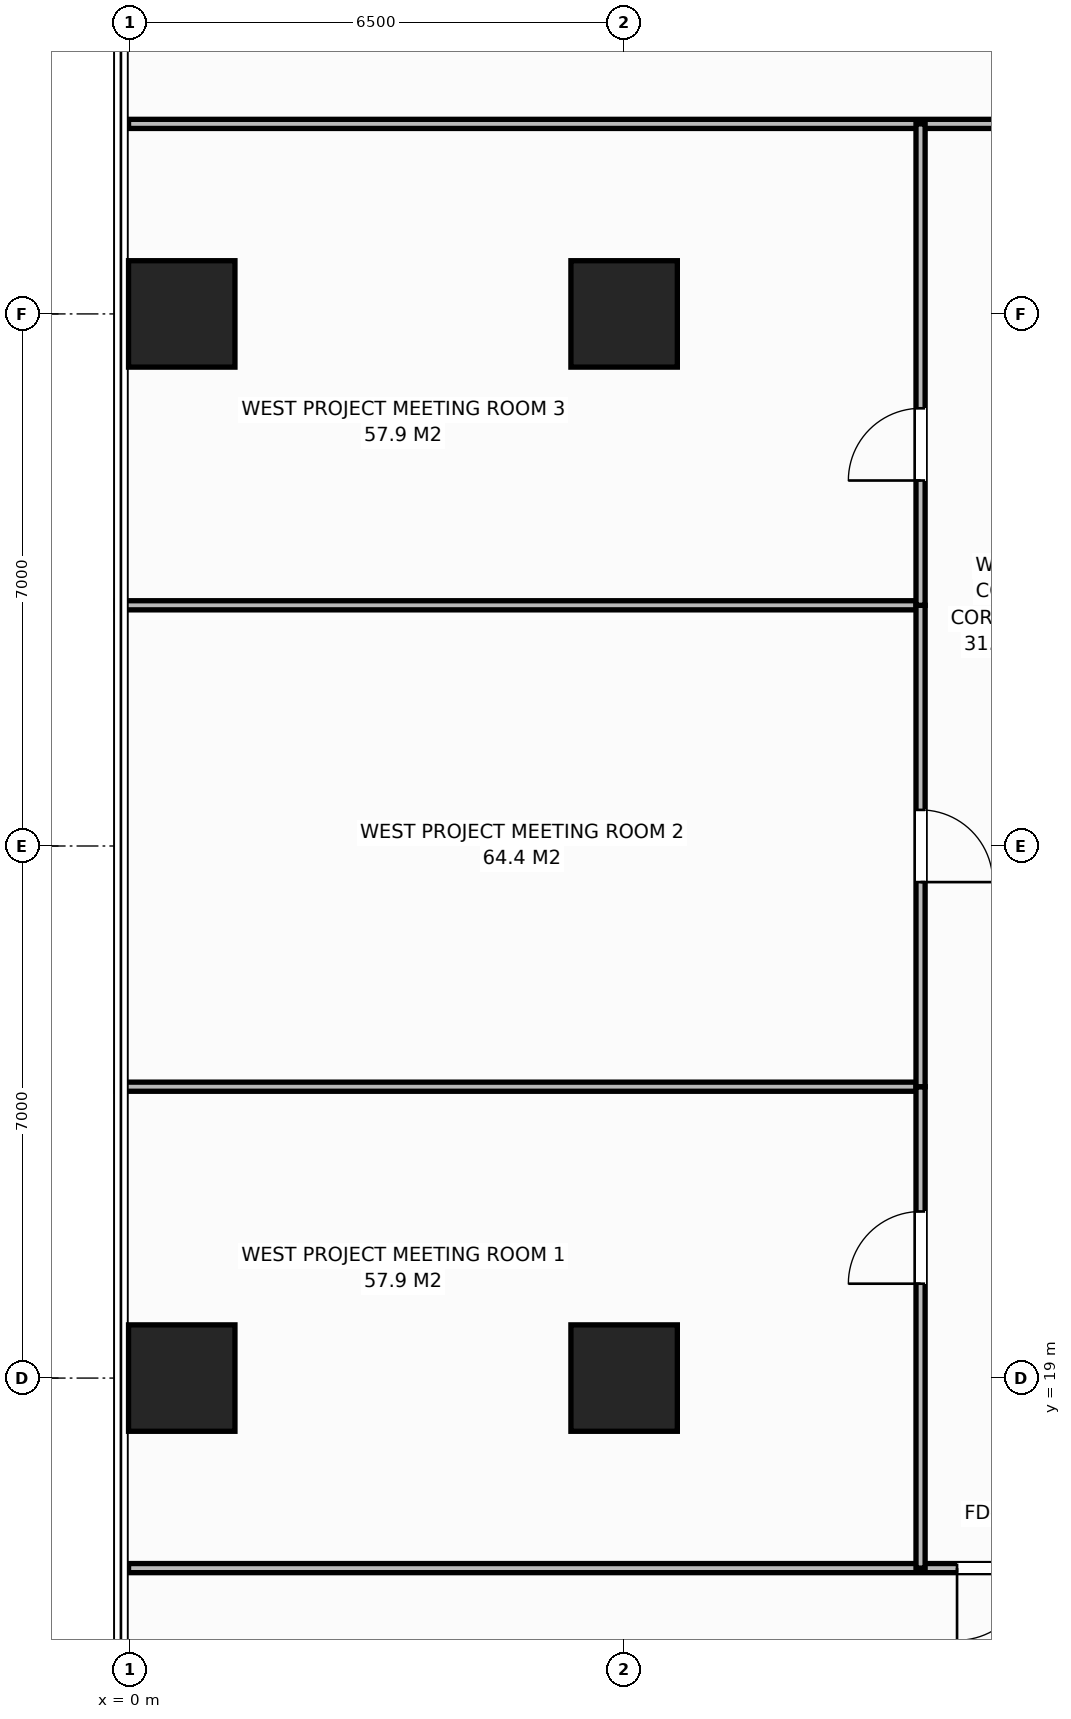
"""IFC4 building model, lengths in metres.
Left out: names, types, materials, properties, quantities, classifications, styles, units other than length and angle.
Written with IfcOpenShell. Run it as: python <this file> out.ifc"""

import sys

from ifc_helpers import new_model, si_unit, direction, frame, frame_2d, origin, origin_2d, place, context, subcontext, project, spatial, rectangle, extrude, element, fill, save


model = new_model("IFC4")
c1 = context("Model", 3, precision=1e-05, world=origin(), true_north=direction((0.0, 1.0)))
c2 = subcontext(c1, "Body", "Model", "MODEL_VIEW")
j1 = project(units=[si_unit("LENGTHUNIT", "METRE"), si_unit("PLANEANGLEUNIT", "RADIAN")], contexts=[c1])
p1 = place(None, origin())
s1 = spatial("IfcSite", under=j1, at=p1, CompositionType="ELEMENT")
p2 = place(p1, origin())
s2 = spatial("IfcBuilding", under=s1, at=p2, CompositionType="ELEMENT")
p3 = place(p2, frame((0.0, 0.0, 50.6)))
s3 = spatial("IfcBuildingStorey", under=s2, at=p3, CompositionType="ELEMENT", Elevation=50.6)
for number, where, z_axis, x_axis in (
    (1, (6.5, 19.0, 0.0), (0.0, 0.0, 1.0), (1.0, 0.0, 0.0)),
    (2, (6.5, 33.0, 0.0), (0.0, 0.0, 1.0), (1.0, 0.0, 0.0)),
    (3, (0.68, 19.0, 0.0), (0.0, 0.0, 1.0), (1.0, 0.0, 0.0)),
    (4, (0.68, 33.0, 0.0), (0.0, 0.0, 1.0), (1.0, 0.0, 0.0)),
):
    element("IfcColumn", number, at=place(p3, frame(where, z_axis=z_axis, x_axis=x_axis)), inside=s3, PredefinedType="COLUMN", context=c2, shape_type="SweptSolid", body=[
        extrude(rectangle(XDim=1.4, YDim=1.4, at=origin_2d()), origin(), (0.0, 0.0, 1.0), 3.8),
    ])
p4 = place(p3, frame((-0.02, 35.5, 0.0), z_axis=(0.0, 0.0, 1.0), x_axis=(1.0, 0.0, 0.0)))
e5 = element("IfcWall", 5, at=p4, inside=s3, PredefinedType="PARTITIONING", context=c2, shape_type="SweptSolid", body=[
    extrude(rectangle(XDim=25.396, YDim=0.12, at=frame_2d((12.698, 0.0))), origin(), (0.0, 0.0, 1.0), 3.55),
])
p5 = place(p4, frame((17.433, 0.0, 0.0)))
e6 = element("IfcOpeningElement", 6, at=p5, cuts=e5, PredefinedType="OPENING", context=c2, shape_type="SweptSolid", body=[
    extrude(rectangle(XDim=0.95, YDim=2.15, at=frame_2d((0.475, 1.075))), frame((0.0, 0.07, 0.0), z_axis=(0.0, -1.0, 0.0), x_axis=(1.0, 0.0, 0.0)), (0.0, 0.0, 1.0), 0.14),
])
p6 = place(p3, frame((-0.02, 16.5, 0.0), z_axis=(0.0, 0.0, 1.0), x_axis=(1.0, 0.0, 0.0)))
e7 = element("IfcWall", 7, at=p6, inside=s3, PredefinedType="PARTITIONING", context=c2, shape_type="SweptSolid", body=[
    extrude(rectangle(XDim=29.041, YDim=0.12, at=frame_2d((14.521, 0.0))), origin(), (0.0, 0.0, 1.0), 3.55),
])
p7 = place(p6, frame((10.9, 0.0, 0.0)))
e8 = element("IfcOpeningElement", 8, at=p7, cuts=e7, PredefinedType="OPENING", context=c2, shape_type="SweptSolid", body=[
    extrude(rectangle(XDim=0.95, YDim=2.15, at=frame_2d((0.475, 1.075))), frame((0.0, 0.07, 0.0), z_axis=(0.0, -1.0, 0.0), x_axis=(1.0, 0.0, 0.0)), (0.0, 0.0, 1.0), 0.14),
])
p8 = place(p3, frame((-0.18, 22.833, 0.0), z_axis=(0.0, 0.0, 1.0), x_axis=(1.0, 0.0, 0.0)))
e9 = element("IfcWall", 9, at=p8, inside=s3, PredefinedType="PARTITIONING", context=c2, shape_type="SweptSolid", body=[
    extrude(rectangle(XDim=10.58, YDim=0.12, at=frame_2d((5.29, 0.0))), origin(), (0.0, 0.0, 1.0), 3.55),
])
p9 = place(p3, frame((10.4, 16.5, 0.0), z_axis=(0.0, 0.0, 1.0), x_axis=(0.0, 1.0, 0.0)))
e10 = element("IfcWall", 10, at=p9, inside=s3, PredefinedType="PARTITIONING", context=c2, shape_type="SweptSolid", body=[
    extrude(rectangle(XDim=6.333, YDim=0.12, at=frame_2d((3.167, 0.0))), origin(), (0.0, 0.0, 1.0), 3.55),
])
p10 = place(p9, frame((3.742, 0.0, 0.0)))
e11 = element("IfcOpeningElement", 11, at=p10, cuts=e10, PredefinedType="OPENING", context=c2, shape_type="SweptSolid", body=[
    extrude(rectangle(XDim=0.95, YDim=2.15, at=frame_2d((0.475, 1.075))), frame((0.0, 0.07, 0.0), z_axis=(0.0, -1.0, 0.0), x_axis=(1.0, 0.0, 0.0)), (0.0, 0.0, 1.0), 0.14),
])
p11 = place(p3, frame((-0.18, 29.167, 0.0), z_axis=(0.0, 0.0, 1.0), x_axis=(1.0, 0.0, 0.0)))
e12 = element("IfcWall", 12, at=p11, inside=s3, PredefinedType="PARTITIONING", context=c2, shape_type="SweptSolid", body=[
    extrude(rectangle(XDim=10.58, YDim=0.12, at=frame_2d((5.29, 0.0))), origin(), (0.0, 0.0, 1.0), 3.55),
])
p12 = place(p3, frame((10.4, 22.833, 0.0), z_axis=(0.0, 0.0, 1.0), x_axis=(0.0, 1.0, 0.0)))
e13 = element("IfcWall", 13, at=p12, inside=s3, PredefinedType="PARTITIONING", context=c2, shape_type="SweptSolid", body=[
    extrude(rectangle(XDim=6.333, YDim=0.12, at=frame_2d((3.167, 0.0))), origin(), (0.0, 0.0, 1.0), 3.55),
])
p13 = place(p12, frame((2.692, 0.0, 0.0)))
e14 = element("IfcOpeningElement", 14, at=p13, cuts=e13, PredefinedType="OPENING", context=c2, shape_type="SweptSolid", body=[
    extrude(rectangle(XDim=0.95, YDim=2.15, at=frame_2d((0.475, 1.075))), frame((0.0, 0.07, 0.0), z_axis=(0.0, -1.0, 0.0), x_axis=(1.0, 0.0, 0.0)), (0.0, 0.0, 1.0), 0.14),
])
p14 = place(p3, frame((10.4, 29.167, 0.0), z_axis=(0.0, 0.0, 1.0), x_axis=(0.0, 1.0, 0.0)))
e15 = element("IfcWall", 15, at=p14, inside=s3, PredefinedType="PARTITIONING", context=c2, shape_type="SweptSolid", body=[
    extrude(rectangle(XDim=6.333, YDim=0.12, at=frame_2d((3.167, 0.0))), origin(), (0.0, 0.0, 1.0), 3.55),
])
p15 = place(p14, frame((1.642, 0.0, 0.0)))
e16 = element("IfcOpeningElement", 16, at=p15, cuts=e15, PredefinedType="OPENING", context=c2, shape_type="SweptSolid", body=[
    extrude(rectangle(XDim=0.95, YDim=2.15, at=frame_2d((0.475, 1.075))), frame((0.0, 0.07, 0.0), z_axis=(0.0, -1.0, 0.0), x_axis=(1.0, 0.0, 0.0)), (0.0, 0.0, 1.0), 0.14),
])
p16 = place(p7, origin())
e17 = element("IfcDoor", 17, at=p16, inside=s3, OperationType="SINGLE_SWING_RIGHT", PredefinedType="DOOR", context=c2, shape_type="SweptSolid", body=[
    extrude(rectangle(XDim=0.95, YDim=2.15, at=frame_2d((0.475, 1.075))), frame((0.0, 0.025, 0.0), z_axis=(0.0, -1.0, 0.0), x_axis=(1.0, 0.0, 0.0)), (0.0, 0.0, 1.0), 0.05),
])
fill(e8, e17)
p17 = place(p10, origin())
e18 = element("IfcDoor", 18, at=p17, inside=s3, OperationType="SINGLE_SWING_LEFT", PredefinedType="DOOR", context=c2, shape_type="SweptSolid", body=[
    extrude(rectangle(XDim=0.95, YDim=2.15, at=frame_2d((0.475, 1.075))), frame((0.0, 0.025, 0.0), z_axis=(0.0, -1.0, 0.0), x_axis=(1.0, 0.0, 0.0)), (0.0, 0.0, 1.0), 0.05),
])
fill(e11, e18)
p18 = place(p13, origin())
e19 = element("IfcDoor", 19, at=p18, inside=s3, OperationType="SINGLE_SWING_RIGHT", PredefinedType="DOOR", context=c2, shape_type="SweptSolid", body=[
    extrude(rectangle(XDim=0.95, YDim=2.15, at=frame_2d((0.475, 1.075))), frame((0.0, 0.025, 0.0), z_axis=(0.0, -1.0, 0.0), x_axis=(1.0, 0.0, 0.0)), (0.0, 0.0, 1.0), 0.05),
])
fill(e14, e19)
p19 = place(p15, origin())
e20 = element("IfcDoor", 20, at=p19, inside=s3, OperationType="SINGLE_SWING_LEFT", PredefinedType="DOOR", context=c2, shape_type="SweptSolid", body=[
    extrude(rectangle(XDim=0.95, YDim=2.15, at=frame_2d((0.475, 1.075))), frame((0.0, 0.025, 0.0), z_axis=(0.0, -1.0, 0.0), x_axis=(1.0, 0.0, 0.0)), (0.0, 0.0, 1.0), 0.05),
])
fill(e16, e20)
save(model, sys.argv[1])
